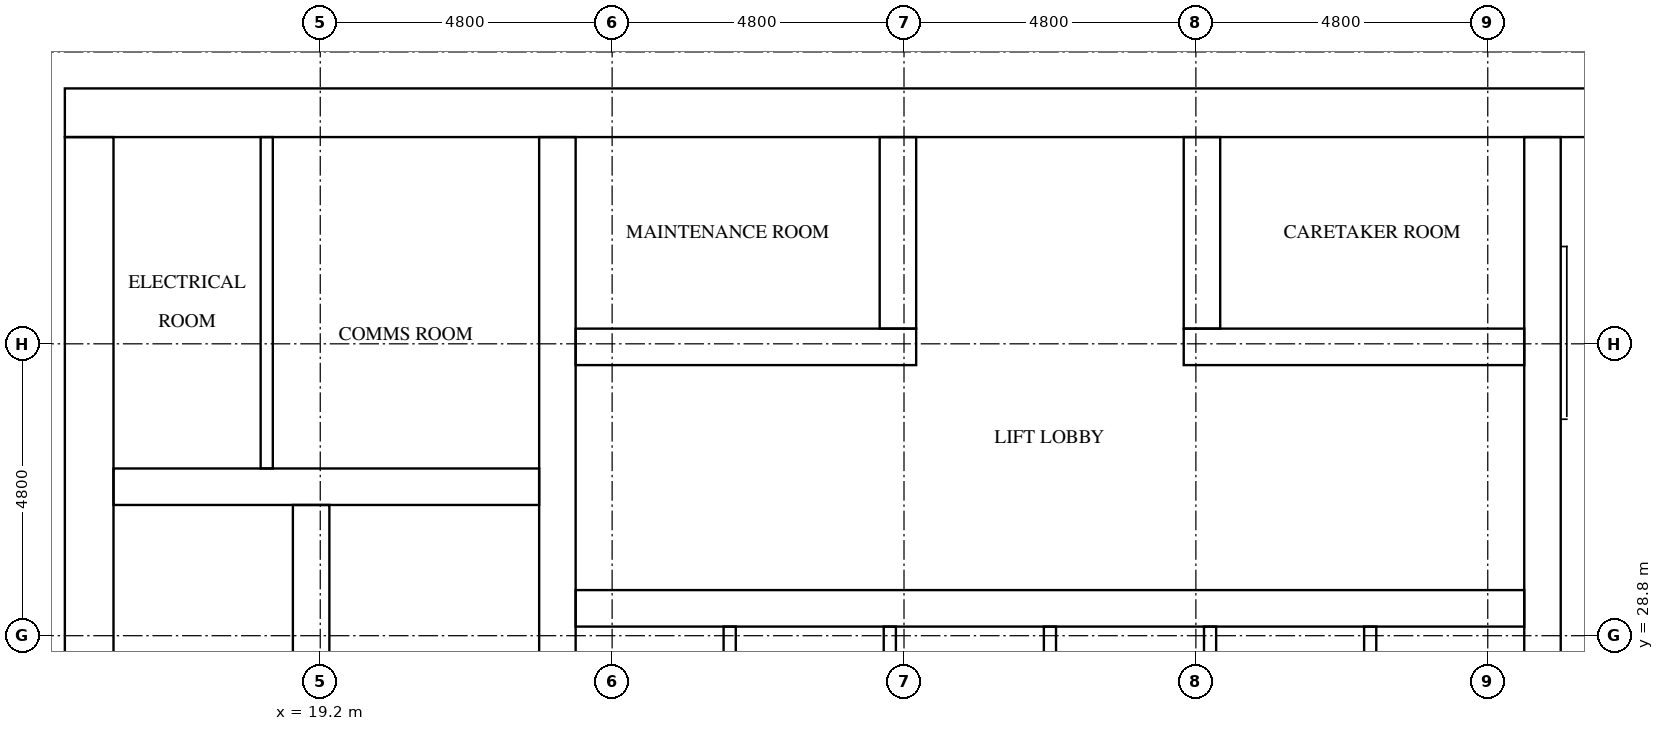
"""IFC4 building model, lengths in metres.
Left out: names, types, materials, properties, quantities, classifications, styles, units other than length and angle.
Written with IfcOpenShell. Run it as: python <this file> out.ifc"""

import sys

from ifc_helpers import new_model, si_unit, direction, frame, frame_2d, origin, place, context, subcontext, project, spatial, rectangle, extrude, element, fill, save


model = new_model("IFC4")
c1 = context("Model", 3, precision=1e-05, world=origin(), true_north=direction((0.0, 1.0)))
c2 = subcontext(c1, "Body", "Model", "MODEL_VIEW")
j1 = project(units=[si_unit("LENGTHUNIT", "METRE"), si_unit("PLANEANGLEUNIT", "RADIAN")], contexts=[c1])
p1 = place(None, origin())
s1 = spatial("IfcSite", under=j1, at=p1, CompositionType="ELEMENT")
p2 = place(p1, origin())
s2 = spatial("IfcBuilding", under=s1, at=p2, CompositionType="ELEMENT")
p3 = place(p2, frame((0.0, 0.0, 163.0)))
s3 = spatial("IfcBuildingStorey", under=s2, at=p3, CompositionType="ELEMENT", Elevation=163.0)
p4 = place(p3, frame((15.0, 37.4, 0.0), z_axis=(0.0, 0.0, 1.0), x_axis=(1.0, 0.0, 0.0)))
e1 = element("IfcWall", 1, at=p4, inside=s3, PredefinedType="SHEAR", context=c2, shape_type="SweptSolid", body=[
    extrude(rectangle(XDim=32.4, YDim=0.8, at=frame_2d((16.2, 0.0))), origin(), (0.0, 0.0, 1.0), 3.2),
])
p5 = place(p4, frame((15.3, 0.0, 0.0)))
e2 = element("IfcOpeningElement", 2, at=p5, cuts=e1, PredefinedType="OPENING", context=c2, shape_type="SweptSolid", body=[
    extrude(rectangle(XDim=1.8, YDim=2.1, at=frame_2d((0.9, 1.05))), frame((0.0, 0.41, 0.0), z_axis=(0.0, -1.0, 0.0), x_axis=(1.0, 0.0, 0.0)), (0.0, 0.0, 1.0), 0.82),
])
p6 = place(p4, frame((1.51, 0.0, 0.0)))
e3 = element("IfcOpeningElement", 3, at=p6, cuts=e1, PredefinedType="OPENING", context=c2, shape_type="SweptSolid", body=[
    extrude(rectangle(XDim=1.0, YDim=2.1, at=frame_2d((0.5, 1.05))), frame((0.0, 0.41, 0.0), z_axis=(0.0, -1.0, 0.0), x_axis=(1.0, 0.0, 0.0)), (0.0, 0.0, 1.0), 0.82),
])
p7 = place(p4, frame((5.11, 0.0, 0.0)))
e4 = element("IfcOpeningElement", 4, at=p7, cuts=e1, PredefinedType="OPENING", context=c2, shape_type="SweptSolid", body=[
    extrude(rectangle(XDim=1.0, YDim=2.1, at=frame_2d((0.5, 1.05))), frame((0.0, 0.41, 0.0), z_axis=(0.0, -1.0, 0.0), x_axis=(1.0, 0.0, 0.0)), (0.0, 0.0, 1.0), 0.82),
])
p8 = place(p3, frame((15.4, 15.8, 0.0), z_axis=(0.0, 0.0, 1.0), x_axis=(0.0, 1.0, 0.0)))
e5 = element("IfcWall", 5, at=p8, inside=s3, PredefinedType="SHEAR", context=c2, shape_type="SweptSolid", body=[
    extrude(rectangle(XDim=21.2, YDim=0.8, at=frame_2d((10.6, 0.0))), origin(), (0.0, 0.0, 1.0), 3.2),
])
p9 = place(p8, frame((4.96, 0.0, 0.0)))
e6 = element("IfcOpeningElement", 6, at=p9, cuts=e5, PredefinedType="OPENING", context=c2, shape_type="SweptSolid", body=[
    extrude(rectangle(XDim=1.2, YDim=2.1, at=frame_2d((0.6, 1.05))), frame((0.0, 0.41, 0.0), z_axis=(0.0, -1.0, 0.0), x_axis=(1.0, 0.0, 0.0)), (0.0, 0.0, 1.0), 0.82),
])
p10 = place(p3, frame((19.05, 15.8, 0.0), z_axis=(0.0, 0.0, 1.0), x_axis=(0.0, 1.0, 0.0)))
e7 = element("IfcWall", 7, at=p10, inside=s3, PredefinedType="SHEAR", context=c2, shape_type="SweptSolid", body=[
    extrude(rectangle(XDim=15.15, YDim=0.6, at=frame_2d((7.575, 0.0))), origin(), (0.0, 0.0, 1.0), 3.2),
])
p11 = place(p10, frame((9.65, 0.0, 0.0)))
e8 = element("IfcOpeningElement", 8, at=p11, cuts=e7, PredefinedType="OPENING", context=c2, shape_type="SweptSolid", body=[
    extrude(rectangle(XDim=1.1, YDim=2.1, at=frame_2d((0.55, 1.05))), frame((0.0, 0.31, 0.0), z_axis=(0.0, -1.0, 0.0), x_axis=(1.0, 0.0, 0.0)), (0.0, 0.0, 1.0), 0.62),
])
p12 = place(p10, frame((13.15, 0.0, 0.0)))
e9 = element("IfcOpeningElement", 9, at=p12, cuts=e7, PredefinedType="OPENING", context=c2, shape_type="SweptSolid", body=[
    extrude(rectangle(XDim=1.1, YDim=2.1, at=frame_2d((0.55, 1.05))), frame((0.0, 0.31, 0.0), z_axis=(0.0, -1.0, 0.0), x_axis=(1.0, 0.0, 0.0)), (0.0, 0.0, 1.0), 0.62),
])
p13 = place(p10, frame((0.4, 0.0, 0.0)))
e10 = element("IfcOpeningElement", 10, at=p13, cuts=e7, PredefinedType="OPENING", context=c2, shape_type="SweptSolid", body=[
    extrude(rectangle(XDim=1.2, YDim=2.1, at=frame_2d((0.6, 1.05))), frame((0.0, 0.31, 0.0), z_axis=(0.0, -1.0, 0.0), x_axis=(1.0, 0.0, 0.0)), (0.0, 0.0, 1.0), 0.62),
])
p14 = place(p3, frame((23.1, 15.8, 0.0), z_axis=(0.0, 0.0, 1.0), x_axis=(0.0, 1.0, 0.0)))
e11 = element("IfcWall", 11, at=p14, inside=s3, PredefinedType="SHEAR", context=c2, shape_type="SweptSolid", body=[
    extrude(rectangle(XDim=21.2, YDim=0.6, at=frame_2d((10.6, 0.0))), origin(), (0.0, 0.0, 1.0), 3.2),
])
p15 = place(p3, frame((39.3, 27.75, 0.0), z_axis=(0.0, 0.0, 1.0), x_axis=(0.0, 1.0, 0.0)))
e12 = element("IfcWall", 12, at=p15, inside=s3, PredefinedType="SHEAR", context=c2, shape_type="SweptSolid", body=[
    extrude(rectangle(XDim=9.25, YDim=0.6, at=frame_2d((4.625, 0.0))), origin(), (0.0, 0.0, 1.0), 3.2),
])
p16 = place(p3, frame((15.8, 31.25, 0.0), z_axis=(0.0, 0.0, 1.0), x_axis=(1.0, 0.0, 0.0)))
e13 = element("IfcWall", 13, at=p16, inside=s3, PredefinedType="SHEAR", context=c2, shape_type="SweptSolid", body=[
    extrude(rectangle(XDim=7.0, YDim=0.6, at=frame_2d((3.5, 0.0))), origin(), (0.0, 0.0, 1.0), 3.2),
])
p17 = place(p3, frame((23.4, 29.25, 0.0), z_axis=(0.0, 0.0, 1.0), x_axis=(1.0, 0.0, 0.0)))
e14 = element("IfcWall", 14, at=p17, inside=s3, PredefinedType="SHEAR", context=c2, shape_type="SweptSolid", body=[
    extrude(rectangle(XDim=15.6, YDim=0.6, at=frame_2d((7.8, 0.0))), origin(), (0.0, 0.0, 1.0), 3.2),
])
p18 = place(p17, frame((0.667, 0.0, 0.0)))
e15 = element("IfcOpeningElement", 15, at=p18, cuts=e14, PredefinedType="OPENING", context=c2, shape_type="SweptSolid", body=[
    extrude(rectangle(XDim=1.1, YDim=2.1, at=frame_2d((0.55, 1.05))), frame((0.0, 0.31, 0.0), z_axis=(0.0, -1.0, 0.0), x_axis=(1.0, 0.0, 0.0)), (0.0, 0.0, 1.0), 0.62),
])
p19 = place(p17, frame((3.3, 0.0, 0.0)))
e16 = element("IfcOpeningElement", 16, at=p19, cuts=e14, PredefinedType="OPENING", context=c2, shape_type="SweptSolid", body=[
    extrude(rectangle(XDim=1.1, YDim=2.1, at=frame_2d((0.55, 1.05))), frame((0.0, 0.31, 0.0), z_axis=(0.0, -1.0, 0.0), x_axis=(1.0, 0.0, 0.0)), (0.0, 0.0, 1.0), 0.62),
])
p20 = place(p17, frame((5.933, 0.0, 0.0)))
e17 = element("IfcOpeningElement", 17, at=p20, cuts=e14, PredefinedType="OPENING", context=c2, shape_type="SweptSolid", body=[
    extrude(rectangle(XDim=1.1, YDim=2.1, at=frame_2d((0.55, 1.05))), frame((0.0, 0.31, 0.0), z_axis=(0.0, -1.0, 0.0), x_axis=(1.0, 0.0, 0.0)), (0.0, 0.0, 1.0), 0.62),
])
p21 = place(p17, frame((8.567, 0.0, 0.0)))
e18 = element("IfcOpeningElement", 18, at=p21, cuts=e14, PredefinedType="OPENING", context=c2, shape_type="SweptSolid", body=[
    extrude(rectangle(XDim=1.1, YDim=2.1, at=frame_2d((0.55, 1.05))), frame((0.0, 0.31, 0.0), z_axis=(0.0, -1.0, 0.0), x_axis=(1.0, 0.0, 0.0)), (0.0, 0.0, 1.0), 0.62),
])
p22 = place(p17, frame((11.2, 0.0, 0.0)))
e19 = element("IfcOpeningElement", 19, at=p22, cuts=e14, PredefinedType="OPENING", context=c2, shape_type="SweptSolid", body=[
    extrude(rectangle(XDim=1.1, YDim=2.1, at=frame_2d((0.55, 1.05))), frame((0.0, 0.31, 0.0), z_axis=(0.0, -1.0, 0.0), x_axis=(1.0, 0.0, 0.0)), (0.0, 0.0, 1.0), 0.62),
])
p23 = place(p17, frame((13.833, 0.0, 0.0)))
e20 = element("IfcOpeningElement", 20, at=p23, cuts=e14, PredefinedType="OPENING", context=c2, shape_type="SweptSolid", body=[
    extrude(rectangle(XDim=1.1, YDim=2.1, at=frame_2d((0.55, 1.05))), frame((0.0, 0.31, 0.0), z_axis=(0.0, -1.0, 0.0), x_axis=(1.0, 0.0, 0.0)), (0.0, 0.0, 1.0), 0.62),
])
p24 = place(p3, frame((23.4, 33.55, 0.0), z_axis=(0.0, 0.0, 1.0), x_axis=(1.0, 0.0, 0.0)))
e21 = element("IfcWall", 21, at=p24, inside=s3, PredefinedType="SHEAR", context=c2, shape_type="SweptSolid", body=[
    extrude(rectangle(XDim=5.6, YDim=0.6, at=frame_2d((2.8, 0.0))), origin(), (0.0, 0.0, 1.0), 3.2),
])
p25 = place(p24, frame((2.0, 0.0, 0.0)))
e22 = element("IfcOpeningElement", 22, at=p25, cuts=e21, PredefinedType="OPENING", context=c2, shape_type="SweptSolid", body=[
    extrude(rectangle(XDim=1.0, YDim=2.1, at=frame_2d((0.5, 1.05))), frame((0.0, 0.31, 0.0), z_axis=(0.0, -1.0, 0.0), x_axis=(1.0, 0.0, 0.0)), (0.0, 0.0, 1.0), 0.62),
])
p26 = place(p3, frame((33.4, 33.55, 0.0), z_axis=(0.0, 0.0, 1.0), x_axis=(1.0, 0.0, 0.0)))
e23 = element("IfcWall", 23, at=p26, inside=s3, PredefinedType="SHEAR", context=c2, shape_type="SweptSolid", body=[
    extrude(rectangle(XDim=5.6, YDim=0.6, at=frame_2d((2.8, 0.0))), origin(), (0.0, 0.0, 1.0), 3.2),
])
p27 = place(p26, frame((2.6, 0.0, 0.0)))
e24 = element("IfcOpeningElement", 24, at=p27, cuts=e23, PredefinedType="OPENING", context=c2, shape_type="SweptSolid", body=[
    extrude(rectangle(XDim=1.0, YDim=2.1, at=frame_2d((0.5, 1.05))), frame((0.0, 0.31, 0.0), z_axis=(0.0, -1.0, 0.0), x_axis=(1.0, 0.0, 0.0)), (0.0, 0.0, 1.0), 0.62),
])
for number, where, z_axis, x_axis in (
    (25, (28.7, 33.85, 0.0), (0.0, 0.0, 1.0), (0.0, 1.0, 0.0)),
    (26, (33.7, 33.85, 0.0), (0.0, 0.0, 1.0), (0.0, 1.0, 0.0)),
):
    element("IfcWall", number, at=place(p3, frame(where, z_axis=z_axis, x_axis=x_axis)), inside=s3, PredefinedType="SHEAR", context=c2, shape_type="SweptSolid", body=[
        extrude(rectangle(XDim=3.15, YDim=0.6, at=frame_2d((1.575, 0.0))), origin(), (0.0, 0.0, 1.0), 3.2),
    ])
for number, where, z_axis, x_axis in (
    (27, (25.933, 26.45, 0.0), (0.0, 0.0, 1.0), (0.0, 1.0, 0.0)),
    (28, (28.567, 26.45, 0.0), (0.0, 0.0, 1.0), (0.0, 1.0, 0.0)),
    (29, (31.2, 26.45, 0.0), (0.0, 0.0, 1.0), (0.0, 1.0, 0.0)),
    (30, (33.833, 26.45, 0.0), (0.0, 0.0, 1.0), (0.0, 1.0, 0.0)),
    (31, (36.467, 26.45, 0.0), (0.0, 0.0, 1.0), (0.0, 1.0, 0.0)),
):
    element("IfcWall", number, at=place(p3, frame(where, z_axis=z_axis, x_axis=x_axis)), inside=s3, PredefinedType="SOLIDWALL", context=c2, shape_type="SweptSolid", body=[
        extrude(rectangle(XDim=2.5, YDim=0.2, at=frame_2d((1.25, 0.0))), origin(), (0.0, 0.0, 1.0), 3.2),
    ])
p28 = place(p3, frame((18.32, 31.55, 0.0), z_axis=(0.0, 0.0, 1.0), x_axis=(0.0, 1.0, 0.0)))
e32 = element("IfcWall", 32, at=p28, inside=s3, PredefinedType="PARTITIONING", context=c2, shape_type="SweptSolid", body=[
    extrude(rectangle(XDim=5.45, YDim=0.2, at=frame_2d((2.725, 0.0))), origin(), (0.0, 0.0, 1.0), 3.2),
])
p29 = place(p18, origin())
e33 = element("IfcDoor", 33, at=p29, inside=s3, OperationType="DOUBLE_DOOR_SLIDING", PredefinedType="DOOR", context=c2, shape_type="SweptSolid", body=[
    extrude(rectangle(XDim=1.1, YDim=2.1, at=frame_2d((0.55, 1.05))), frame((0.0, 0.025, 0.0), z_axis=(0.0, -1.0, 0.0), x_axis=(1.0, 0.0, 0.0)), (0.0, 0.0, 1.0), 0.05),
])
fill(e15, e33)
p30 = place(p19, origin())
e34 = element("IfcDoor", 34, at=p30, inside=s3, OperationType="DOUBLE_DOOR_SLIDING", PredefinedType="DOOR", context=c2, shape_type="SweptSolid", body=[
    extrude(rectangle(XDim=1.1, YDim=2.1, at=frame_2d((0.55, 1.05))), frame((0.0, 0.025, 0.0), z_axis=(0.0, -1.0, 0.0), x_axis=(1.0, 0.0, 0.0)), (0.0, 0.0, 1.0), 0.05),
])
fill(e16, e34)
p31 = place(p20, origin())
e35 = element("IfcDoor", 35, at=p31, inside=s3, OperationType="DOUBLE_DOOR_SLIDING", PredefinedType="DOOR", context=c2, shape_type="SweptSolid", body=[
    extrude(rectangle(XDim=1.1, YDim=2.1, at=frame_2d((0.55, 1.05))), frame((0.0, 0.025, 0.0), z_axis=(0.0, -1.0, 0.0), x_axis=(1.0, 0.0, 0.0)), (0.0, 0.0, 1.0), 0.05),
])
fill(e17, e35)
p32 = place(p21, origin())
e36 = element("IfcDoor", 36, at=p32, inside=s3, OperationType="DOUBLE_DOOR_SLIDING", PredefinedType="DOOR", context=c2, shape_type="SweptSolid", body=[
    extrude(rectangle(XDim=1.1, YDim=2.1, at=frame_2d((0.55, 1.05))), frame((0.0, 0.025, 0.0), z_axis=(0.0, -1.0, 0.0), x_axis=(1.0, 0.0, 0.0)), (0.0, 0.0, 1.0), 0.05),
])
fill(e18, e36)
p33 = place(p22, origin())
e37 = element("IfcDoor", 37, at=p33, inside=s3, OperationType="DOUBLE_DOOR_SLIDING", PredefinedType="DOOR", context=c2, shape_type="SweptSolid", body=[
    extrude(rectangle(XDim=1.1, YDim=2.1, at=frame_2d((0.55, 1.05))), frame((0.0, 0.025, 0.0), z_axis=(0.0, -1.0, 0.0), x_axis=(1.0, 0.0, 0.0)), (0.0, 0.0, 1.0), 0.05),
])
fill(e19, e37)
p34 = place(p23, origin())
e38 = element("IfcDoor", 38, at=p34, inside=s3, OperationType="DOUBLE_DOOR_SLIDING", PredefinedType="DOOR", context=c2, shape_type="SweptSolid", body=[
    extrude(rectangle(XDim=1.1, YDim=2.1, at=frame_2d((0.55, 1.05))), frame((0.0, 0.025, 0.0), z_axis=(0.0, -1.0, 0.0), x_axis=(1.0, 0.0, 0.0)), (0.0, 0.0, 1.0), 0.05),
])
fill(e20, e38)
p35 = place(p12, origin())
e39 = element("IfcDoor", 39, at=p35, inside=s3, OperationType="DOUBLE_DOOR_SLIDING", PredefinedType="DOOR", context=c2, shape_type="SweptSolid", body=[
    extrude(rectangle(XDim=1.1, YDim=2.1, at=frame_2d((0.55, 1.05))), frame((0.0, 0.025, 0.0), z_axis=(0.0, -1.0, 0.0), x_axis=(1.0, 0.0, 0.0)), (0.0, 0.0, 1.0), 0.05),
])
fill(e9, e39)
p36 = place(p5, origin())
e40 = element("IfcDoor", 40, at=p36, inside=s3, OperationType="DOUBLE_DOOR_SINGLE_SWING", PredefinedType="DOOR", context=c2, shape_type="SweptSolid", body=[
    extrude(rectangle(XDim=1.8, YDim=2.1, at=frame_2d((0.9, 1.05))), frame((0.0, 0.025, 0.0), z_axis=(0.0, -1.0, 0.0), x_axis=(1.0, 0.0, 0.0)), (0.0, 0.0, 1.0), 0.05),
])
fill(e2, e40)
p37 = place(p6, origin())
e41 = element("IfcDoor", 41, at=p37, inside=s3, OperationType="SINGLE_SWING_LEFT", PredefinedType="DOOR", context=c2, shape_type="SweptSolid", body=[
    extrude(rectangle(XDim=1.0, YDim=2.1, at=frame_2d((0.5, 1.05))), frame((0.0, 0.025, 0.0), z_axis=(0.0, -1.0, 0.0), x_axis=(1.0, 0.0, 0.0)), (0.0, 0.0, 1.0), 0.05),
])
fill(e3, e41)
p38 = place(p7, origin())
e42 = element("IfcDoor", 42, at=p38, inside=s3, OperationType="SINGLE_SWING_RIGHT", PredefinedType="DOOR", context=c2, shape_type="SweptSolid", body=[
    extrude(rectangle(XDim=1.0, YDim=2.1, at=frame_2d((0.5, 1.05))), frame((0.0, 0.025, 0.0), z_axis=(0.0, -1.0, 0.0), x_axis=(1.0, 0.0, 0.0)), (0.0, 0.0, 1.0), 0.05),
])
fill(e4, e42)
p39 = place(p25, frame((1.0, 0.0, 0.0), z_axis=(0.0, 0.0, 1.0), x_axis=(-1.0, 0.0, 0.0)))
e43 = element("IfcDoor", 43, at=p39, inside=s3, OperationType="SINGLE_SWING_LEFT", PredefinedType="DOOR", context=c2, shape_type="SweptSolid", body=[
    extrude(rectangle(XDim=1.0, YDim=2.1, at=frame_2d((0.5, 1.05))), frame((0.0, 0.025, 0.0), z_axis=(0.0, -1.0, 0.0), x_axis=(1.0, 0.0, 0.0)), (0.0, 0.0, 1.0), 0.05),
])
fill(e22, e43)
p40 = place(p27, frame((1.0, 0.0, 0.0), z_axis=(0.0, 0.0, 1.0), x_axis=(-1.0, 0.0, 0.0)))
e44 = element("IfcDoor", 44, at=p40, inside=s3, OperationType="SINGLE_SWING_RIGHT", PredefinedType="DOOR", context=c2, shape_type="SweptSolid", body=[
    extrude(rectangle(XDim=1.0, YDim=2.1, at=frame_2d((0.5, 1.05))), frame((0.0, 0.025, 0.0), z_axis=(0.0, -1.0, 0.0), x_axis=(1.0, 0.0, 0.0)), (0.0, 0.0, 1.0), 0.05),
])
fill(e24, e44)
save(model, sys.argv[1])
